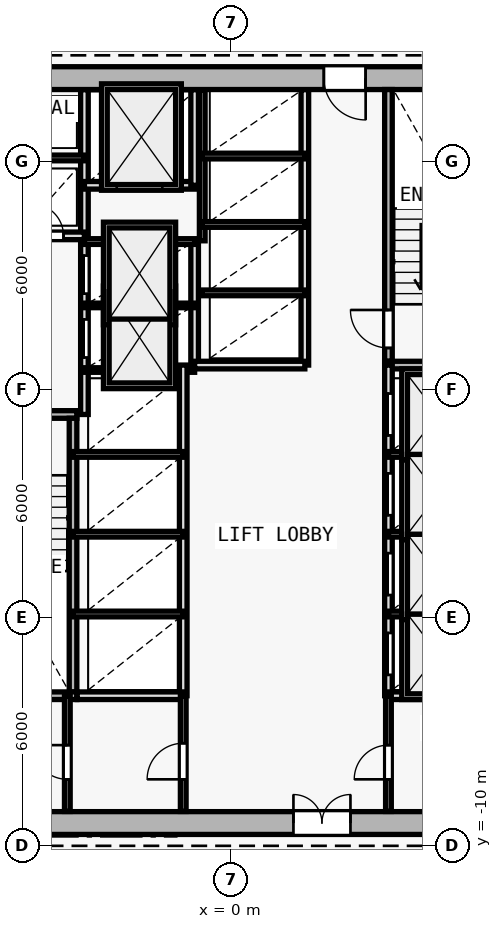
"""IFC4 building model, lengths in metres.
Left out: names, types, materials, properties, quantities, classifications, styles, units other than length and angle.
Written with IfcOpenShell. Run it as: python <this file> out.ifc"""

import sys

from ifc_helpers import new_model, si_unit, direction, frame, frame_2d, origin, origin_2d, place, context, subcontext, project, spatial, rectangle, i_section, extrude, element, fill, save


model = new_model("IFC4")
c1 = context("Model", 3, precision=1e-05, world=origin(), true_north=direction((0.0, 1.0)))
c2 = subcontext(c1, "Body", "Model", "MODEL_VIEW")
j1 = project(units=[si_unit("LENGTHUNIT", "METRE"), si_unit("PLANEANGLEUNIT", "RADIAN")], contexts=[c1])
p1 = place(None, origin())
s1 = spatial("IfcSite", under=j1, at=p1, CompositionType="ELEMENT")
p2 = place(p1, origin())
s2 = spatial("IfcBuilding", under=s1, at=p2, CompositionType="ELEMENT")
p3 = place(p2, frame((0.0, 0.0, 33.6)))
s3 = spatial("IfcBuildingStorey", under=s2, at=p3, CompositionType="ELEMENT", Elevation=33.6)
p4 = place(p3, frame((0.0, -9.4, 0.0), z_axis=(0.0, 0.0, 1.0), x_axis=(1.0, 0.0, 0.0)))
e1 = element("IfcColumn", 1, at=p4, inside=s3, PredefinedType="COLUMN", context=c2, shape_type="SweptSolid", body=[
    extrude(i_section(OverallWidth=0.416, OverallDepth=0.446, WebThickness=0.025, FlangeThickness=0.04, FilletRadius=0.015, at=origin_2d()), origin(), (0.0, 0.0, 1.0), 3.6),
])
p5 = place(p3, frame((-8.0, -9.4, 0.0), z_axis=(0.0, 0.0, 1.0), x_axis=(1.0, 0.0, 0.0)))
e2 = element("IfcWall", 2, at=p5, inside=s3, PredefinedType="SHEAR", context=c2, shape_type="SweptSolid", body=[
    extrude(rectangle(XDim=16.0, YDim=0.6, at=frame_2d((8.0, 0.0))), origin(), (0.0, 0.0, 1.0), 3.35),
])
p6 = place(p5, frame((9.65, 0.0, 0.0)))
e3 = element("IfcOpeningElement", 3, at=p6, cuts=e2, PredefinedType="OPENING", context=c2, shape_type="SweptSolid", body=[
    extrude(rectangle(XDim=1.5, YDim=2.2, at=frame_2d((0.75, 1.1))), frame((0.0, 0.31, 0.0), z_axis=(0.0, -1.0, 0.0), x_axis=(1.0, 0.0, 0.0)), (0.0, 0.0, 1.0), 0.62),
])
p7 = place(p3, frame((8.0, 10.2, 0.0), z_axis=(0.0, 0.0, 1.0), x_axis=(-1.0, 0.0, 0.0)))
e4 = element("IfcWall", 4, at=p7, inside=s3, PredefinedType="SHEAR", context=c2, shape_type="SweptSolid", body=[
    extrude(rectangle(XDim=16.0, YDim=0.6, at=frame_2d((8.0, 0.0))), origin(), (0.0, 0.0, 1.0), 3.35),
])
p8 = place(p7, frame((4.45, 0.0, 0.0)))
e5 = element("IfcOpeningElement", 5, at=p8, cuts=e4, PredefinedType="OPENING", context=c2, shape_type="SweptSolid", body=[
    extrude(rectangle(XDim=1.1, YDim=2.15, at=frame_2d((0.55, 1.075))), frame((0.0, 0.31, 0.0), z_axis=(0.0, -1.0, 0.0), x_axis=(1.0, 0.0, 0.0)), (0.0, 0.0, 1.0), 0.62),
])
p9 = place(p3, frame((-7.4, 1.35, 0.0), z_axis=(0.0, 0.0, 1.0), x_axis=(1.0, 0.0, 0.0)))
e6 = element("IfcWall", 6, at=p9, inside=s3, PredefinedType="SOLIDWALL", context=c2, shape_type="SweptSolid", body=[
    extrude(rectangle(XDim=3.35, YDim=0.2, at=frame_2d((1.675, 0.0))), origin(), (0.0, 0.0, 1.0), 3.35),
])
p10 = place(p9, frame((0.65, 0.0, 0.0)))
e7 = element("IfcOpeningElement", 7, at=p10, cuts=e6, PredefinedType="OPENING", context=c2, shape_type="SweptSolid", body=[
    extrude(rectangle(XDim=1.0, YDim=2.15, at=frame_2d((0.5, 1.075))), frame((0.0, 0.11, 0.0), z_axis=(0.0, -1.0, 0.0), x_axis=(1.0, 0.0, 0.0)), (0.0, 0.0, 1.0), 0.22),
])
p11 = place(p3, frame((-4.15, -5.95, 0.0), z_axis=(0.0, 0.0, 1.0), x_axis=(0.0, 1.0, 0.0)))
e8 = element("IfcWall", 8, at=p11, inside=s3, PredefinedType="SOLIDWALL", context=c2, shape_type="SweptSolid", body=[
    extrude(rectangle(XDim=7.2, YDim=0.2, at=frame_2d((3.6, 0.0))), origin(), (0.0, 0.0, 1.0), 3.35),
])
p12 = place(p3, frame((-3.85, 1.35, 0.0), z_axis=(0.0, 0.0, 1.0), x_axis=(0.0, 1.0, 0.0)))
e9 = element("IfcWall", 9, at=p12, inside=s3, PredefinedType="SOLIDWALL", context=c2, shape_type="SweptSolid", body=[
    extrude(rectangle(XDim=8.545, YDim=0.2, at=frame_2d((4.272, 0.0))), origin(), (0.0, 0.0, 1.0), 3.35),
])
p13 = place(p12, frame((1.5, 0.0, 0.0)))
e10 = element("IfcOpeningElement", 10, at=p13, cuts=e9, PredefinedType="OPENING", context=c2, shape_type="SweptSolid", body=[
    extrude(rectangle(XDim=1.0, YDim=2.15, at=frame_2d((0.5, 1.075))), frame((0.0, 0.11, 0.0), z_axis=(0.0, -1.0, 0.0), x_axis=(1.0, 0.0, 0.0)), (0.0, 0.0, 1.0), 0.22),
])
p14 = place(p12, frame((3.18, 0.0, 0.0)))
e11 = element("IfcOpeningElement", 11, at=p14, cuts=e9, PredefinedType="OPENING", context=c2, shape_type="SweptSolid", body=[
    extrude(rectangle(XDim=1.0, YDim=2.15, at=frame_2d((0.5, 1.075))), frame((0.0, 0.11, 0.0), z_axis=(0.0, -1.0, 0.0), x_axis=(1.0, 0.0, 0.0)), (0.0, 0.0, 1.0), 0.22),
])
p15 = place(p3, frame((-7.395, 6.05, 0.0), z_axis=(0.0, 0.0, 1.0), x_axis=(1.0, 0.0, 0.0)))
e12 = element("IfcWall", 12, at=p15, inside=s3, PredefinedType="SOLIDWALL", context=c2, shape_type="SweptSolid", body=[
    extrude(rectangle(XDim=3.545, YDim=0.2, at=frame_2d((1.772, 0.0))), origin(), (0.0, 0.0, 1.0), 3.35),
])
p16 = place(p15, frame((0.345, 0.0, 0.0)))
e13 = element("IfcOpeningElement", 13, at=p16, cuts=e12, PredefinedType="OPENING", context=c2, shape_type="SweptSolid", body=[
    extrude(rectangle(XDim=0.85, YDim=2.1, at=frame_2d((0.425, 1.05))), frame((0.0, 0.11, 0.0), z_axis=(0.0, -1.0, 0.0), x_axis=(1.0, 0.0, 0.0)), (0.0, 0.0, 1.0), 0.22),
])
p17 = place(p15, frame((2.145, 0.0, 0.0)))
e14 = element("IfcOpeningElement", 14, at=p17, cuts=e12, PredefinedType="OPENING", context=c2, shape_type="SweptSolid", body=[
    extrude(rectangle(XDim=0.85, YDim=2.1, at=frame_2d((0.425, 1.05))), frame((0.0, 0.11, 0.0), z_axis=(0.0, -1.0, 0.0), x_axis=(1.0, 0.0, 0.0)), (0.0, 0.0, 1.0), 0.22),
])
p18 = place(p3, frame((-7.395, 8.1, 0.0), z_axis=(0.0, 0.0, 1.0), x_axis=(1.0, 0.0, 0.0)))
e15 = element("IfcWall", 15, at=p18, inside=s3, PredefinedType="PARTITIONING", context=c2, shape_type="SweptSolid", body=[
    extrude(rectangle(XDim=3.545, YDim=0.15, at=frame_2d((1.772, 0.0))), origin(), (0.0, 0.0, 1.0), 3.35),
])
p19 = place(p3, frame((4.15, 2.75, 0.0), z_axis=(0.0, 0.0, 1.0), x_axis=(0.0, 1.0, 0.0)))
e16 = element("IfcWall", 16, at=p19, inside=s3, PredefinedType="SOLIDWALL", context=c2, shape_type="SweptSolid", body=[
    extrude(rectangle(XDim=7.15, YDim=0.2, at=frame_2d((3.575, 0.0))), origin(), (0.0, 0.0, 1.0), 3.35),
])
p20 = place(p19, frame((0.35, 0.0, 0.0)))
e17 = element("IfcOpeningElement", 17, at=p20, cuts=e16, PredefinedType="OPENING", context=c2, shape_type="SweptSolid", body=[
    extrude(rectangle(XDim=1.0, YDim=2.15, at=frame_2d((0.5, 1.075))), frame((0.0, 0.11, 0.0), z_axis=(0.0, -1.0, 0.0), x_axis=(1.0, 0.0, 0.0)), (0.0, 0.0, 1.0), 0.22),
])
p21 = place(p3, frame((4.05, 2.65, 0.0), z_axis=(0.0, 0.0, 1.0), x_axis=(1.0, 0.0, 0.0)))
e18 = element("IfcWall", 18, at=p21, inside=s3, PredefinedType="SOLIDWALL", context=c2, shape_type="SweptSolid", body=[
    extrude(rectangle(XDim=3.35, YDim=0.2, at=frame_2d((1.675, 0.0))), origin(), (0.0, 0.0, 1.0), 3.35),
])
p22 = place(p3, frame((-0.95, 2.65, 0.0), z_axis=(0.0, 0.0, 1.0), x_axis=(0.0, 1.0, 0.0)))
e19 = element("IfcWall", 19, at=p22, inside=s3, PredefinedType="SOLIDWALL", context=c2, shape_type="SweptSolid", body=[
    extrude(rectangle(XDim=3.27, YDim=0.2, at=frame_2d((1.635, 0.0))), origin(), (0.0, 0.0, 1.0), 3.35),
])
for number, where, z_axis, x_axis in (
    (20, (-3.85, 2.52, 0.0), (0.0, 0.0, 1.0), (1.0, 0.0, 0.0)),
    (21, (-3.85, 4.22, 0.0), (0.0, 0.0, 1.0), (1.0, 0.0, 0.0)),
):
    element("IfcWall", number, at=place(p3, frame(where, z_axis=z_axis, x_axis=x_axis)), inside=s3, PredefinedType="PARTITIONING", context=c2, shape_type="SweptSolid", body=[
        extrude(rectangle(XDim=2.9, YDim=0.12, at=frame_2d((1.45, 0.0))), origin(), (0.0, 0.0, 1.0), 3.35),
    ])
p23 = place(p3, frame((-3.85, 5.9, 0.0), z_axis=(0.0, 0.0, 1.0), x_axis=(1.0, 0.0, 0.0)))
e22 = element("IfcWall", 22, at=p23, inside=s3, PredefinedType="PARTITIONING", context=c2, shape_type="SweptSolid", body=[
    extrude(rectangle(XDim=2.9, YDim=0.15, at=frame_2d((1.45, 0.0))), origin(), (0.0, 0.0, 1.0), 3.35),
])
p24 = place(p3, frame((-3.85, 7.38, 0.0), z_axis=(0.0, 0.0, 1.0), x_axis=(1.0, 0.0, 0.0)))
e23 = element("IfcWall", 23, at=p24, inside=s3, PredefinedType="SOLIDWALL", context=c2, shape_type="SweptSolid", body=[
    extrude(rectangle(XDim=2.9, YDim=0.2, at=frame_2d((1.45, 0.0))), origin(), (0.0, 0.0, 1.0), 3.35),
])
p25 = place(p24, frame((0.85, 0.0, 0.0)))
e24 = element("IfcOpeningElement", 24, at=p25, cuts=e23, PredefinedType="OPENING", context=c2, shape_type="SweptSolid", body=[
    extrude(rectangle(XDim=1.2, YDim=2.2, at=frame_2d((0.6, 1.1))), frame((0.0, 0.11, 0.0), z_axis=(0.0, -1.0, 0.0), x_axis=(1.0, 0.0, 0.0)), (0.0, 0.0, 1.0), 0.22),
])
p26 = place(p3, frame((-0.95, 7.38, 0.0), z_axis=(0.0, 0.0, 1.0), x_axis=(0.0, 1.0, 0.0)))
e25 = element("IfcWall", 25, at=p26, inside=s3, PredefinedType="SOLIDWALL", context=c2, shape_type="SweptSolid", body=[
    extrude(rectangle(XDim=2.515, YDim=0.2, at=frame_2d((1.258, 0.0))), origin(), (0.0, 0.0, 1.0), 3.35),
])
p27 = place(p3, frame((4.15, -6.05, 0.0), z_axis=(0.0, 0.0, 1.0), x_axis=(0.0, 1.0, 0.0)))
e26 = element("IfcWall", 26, at=p27, inside=s3, PredefinedType="SOLIDWALL", context=c2, shape_type="SweptSolid", body=[
    extrude(rectangle(XDim=8.7, YDim=0.2, at=frame_2d((4.35, 0.0))), origin(), (0.0, 0.0, 1.0), 3.35),
])
p28 = place(p27, frame((0.55, 0.0, 0.0)))
e27 = element("IfcOpeningElement", 27, at=p28, cuts=e26, PredefinedType="OPENING", context=c2, shape_type="SweptSolid", body=[
    extrude(rectangle(XDim=1.1, YDim=2.15, at=frame_2d((0.55, 1.075))), frame((0.0, 0.11, 0.0), z_axis=(0.0, -1.0, 0.0), x_axis=(1.0, 0.0, 0.0)), (0.0, 0.0, 1.0), 0.22),
])
p29 = place(p27, frame((2.65, 0.0, 0.0)))
e28 = element("IfcOpeningElement", 28, at=p29, cuts=e26, PredefinedType="OPENING", context=c2, shape_type="SweptSolid", body=[
    extrude(rectangle(XDim=1.1, YDim=2.15, at=frame_2d((0.55, 1.075))), frame((0.0, 0.11, 0.0), z_axis=(0.0, -1.0, 0.0), x_axis=(1.0, 0.0, 0.0)), (0.0, 0.0, 1.0), 0.22),
])
p30 = place(p27, frame((4.75, 0.0, 0.0)))
e29 = element("IfcOpeningElement", 29, at=p30, cuts=e26, PredefinedType="OPENING", context=c2, shape_type="SweptSolid", body=[
    extrude(rectangle(XDim=1.1, YDim=2.15, at=frame_2d((0.55, 1.075))), frame((0.0, 0.11, 0.0), z_axis=(0.0, -1.0, 0.0), x_axis=(1.0, 0.0, 0.0)), (0.0, 0.0, 1.0), 0.22),
])
p31 = place(p27, frame((6.85, 0.0, 0.0)))
e30 = element("IfcOpeningElement", 30, at=p31, cuts=e26, PredefinedType="OPENING", context=c2, shape_type="SweptSolid", body=[
    extrude(rectangle(XDim=1.1, YDim=2.15, at=frame_2d((0.55, 1.075))), frame((0.0, 0.11, 0.0), z_axis=(0.0, -1.0, 0.0), x_axis=(1.0, 0.0, 0.0)), (0.0, 0.0, 1.0), 0.22),
])
for number, where, z_axis, x_axis in (
    (31, (4.15, -3.9, 0.0), (0.0, 0.0, 1.0), (1.0, 0.0, 0.0)),
    (32, (4.15, -1.8, 0.0), (0.0, 0.0, 1.0), (1.0, 0.0, 0.0)),
    (33, (4.15, 0.3, 0.0), (0.0, 0.0, 1.0), (1.0, 0.0, 0.0)),
):
    element("IfcWall", number, at=place(p3, frame(where, z_axis=z_axis, x_axis=x_axis)), inside=s3, PredefinedType="PARTITIONING", context=c2, shape_type="SweptSolid", body=[
        extrude(rectangle(XDim=2.6, YDim=0.15, at=frame_2d((1.3, 0.0))), origin(), (0.0, 0.0, 1.0), 3.35),
    ])
p32 = place(p3, frame((-1.25, -6.05, 0.0), z_axis=(0.0, 0.0, 1.0), x_axis=(0.0, 1.0, 0.0)))
e34 = element("IfcWall", 34, at=p32, inside=s3, PredefinedType="SOLIDWALL", context=c2, shape_type="SweptSolid", body=[
    extrude(rectangle(XDim=8.7, YDim=0.2, at=frame_2d((4.35, 0.0))), origin(), (0.0, 0.0, 1.0), 3.35),
])
for number, where, z_axis, x_axis in (
    (35, (-4.15, -3.9, 0.0), (0.0, 0.0, 1.0), (1.0, 0.0, 0.0)),
    (36, (-4.15, -1.8, 0.0), (0.0, 0.0, 1.0), (1.0, 0.0, 0.0)),
    (37, (-4.15, 0.3, 0.0), (0.0, 0.0, 1.0), (1.0, 0.0, 0.0)),
):
    element("IfcWall", number, at=place(p3, frame(where, z_axis=z_axis, x_axis=x_axis)), inside=s3, PredefinedType="PARTITIONING", context=c2, shape_type="SweptSolid", body=[
        extrude(rectangle(XDim=2.9, YDim=0.15, at=frame_2d((1.45, 0.0))), origin(), (0.0, 0.0, 1.0), 3.35),
    ])
p33 = place(p3, frame((1.95, 2.65, 0.0), z_axis=(0.0, 0.0, 1.0), x_axis=(0.0, 1.0, 0.0)))
e38 = element("IfcWall", 38, at=p33, inside=s3, PredefinedType="SOLIDWALL", context=c2, shape_type="SweptSolid", body=[
    extrude(rectangle(XDim=7.245, YDim=0.2, at=frame_2d((3.623, 0.0))), origin(), (0.0, 0.0, 1.0), 3.35),
])
p34 = place(p3, frame((-0.95, 2.65, 0.0), z_axis=(0.0, 0.0, 1.0), x_axis=(1.0, 0.0, 0.0)))
e39 = element("IfcWall", 39, at=p34, inside=s3, PredefinedType="SOLIDWALL", context=c2, shape_type="SweptSolid", body=[
    extrude(rectangle(XDim=2.9, YDim=0.2, at=frame_2d((1.45, 0.0))), origin(), (0.0, 0.0, 1.0), 3.35),
])
p35 = place(p3, frame((-0.75, 5.92, 0.0), z_axis=(0.0, 0.0, 1.0), x_axis=(0.0, 1.0, 0.0)))
e40 = element("IfcWall", 40, at=p35, inside=s3, PredefinedType="PARTITIONING", context=c2, shape_type="SweptSolid", body=[
    extrude(rectangle(XDim=3.975, YDim=0.15, at=frame_2d((1.988, 0.0))), origin(), (0.0, 0.0, 1.0), 3.35),
])
for number, where, z_axis, x_axis in (
    (41, (-0.75, 4.55, 0.0), (0.0, 0.0, 1.0), (1.0, 0.0, 0.0)),
    (42, (-0.75, 6.35, 0.0), (0.0, 0.0, 1.0), (1.0, 0.0, 0.0)),
    (43, (-0.75, 8.15, 0.0), (0.0, 0.0, 1.0), (1.0, 0.0, 0.0)),
):
    element("IfcWall", number, at=place(p3, frame(where, z_axis=z_axis, x_axis=x_axis)), inside=s3, PredefinedType="PARTITIONING", context=c2, shape_type="SweptSolid", body=[
        extrude(rectangle(XDim=2.7, YDim=0.15, at=frame_2d((1.35, 0.0))), origin(), (0.0, 0.0, 1.0), 3.35),
    ])
p36 = place(p3, frame((-7.4, -6.05, 0.0), z_axis=(0.0, 0.0, 1.0), x_axis=(1.0, 0.0, 0.0)))
e44 = element("IfcWall", 44, at=p36, inside=s3, PredefinedType="SOLIDWALL", context=c2, shape_type="SweptSolid", body=[
    extrude(rectangle(XDim=3.35, YDim=0.2, at=frame_2d((1.675, 0.0))), origin(), (0.0, 0.0, 1.0), 3.35),
])
p37 = place(p3, frame((-4.04, -6.05, 0.0), z_axis=(0.0, 0.0, 1.0), x_axis=(1.0, 0.0, 0.0)))
e45 = element("IfcWall", 45, at=p37, inside=s3, PredefinedType="SOLIDWALL", context=c2, shape_type="SweptSolid", body=[
    extrude(rectangle(XDim=2.79, YDim=0.2, at=frame_2d((1.395, 0.0))), origin(), (0.0, 0.0, 1.0), 3.35),
])
p38 = place(p3, frame((4.15, -6.05, 0.0), z_axis=(0.0, 0.0, 1.0), x_axis=(1.0, 0.0, 0.0)))
e46 = element("IfcWall", 46, at=p38, inside=s3, PredefinedType="SOLIDWALL", context=c2, shape_type="SweptSolid", body=[
    extrude(rectangle(XDim=3.245, YDim=0.2, at=frame_2d((1.623, 0.0))), origin(), (0.0, 0.0, 1.0), 3.35),
])
p39 = place(p3, frame((-1.25, -9.095, 0.0), z_axis=(0.0, 0.0, 1.0), x_axis=(0.0, 1.0, 0.0)))
e47 = element("IfcWall", 47, at=p39, inside=s3, PredefinedType="PARTITIONING", context=c2, shape_type="SweptSolid", body=[
    extrude(rectangle(XDim=3.045, YDim=0.15, at=frame_2d((1.522, 0.0))), origin(), (0.0, 0.0, 1.0), 3.35),
])
p40 = place(p39, frame((0.845, 0.0, 0.0)))
e48 = element("IfcOpeningElement", 48, at=p40, cuts=e47, PredefinedType="OPENING", context=c2, shape_type="SweptSolid", body=[
    extrude(rectangle(XDim=0.95, YDim=2.1, at=frame_2d((0.475, 1.05))), frame((0.0, 0.085, 0.0), z_axis=(0.0, -1.0, 0.0), x_axis=(1.0, 0.0, 0.0)), (0.0, 0.0, 1.0), 0.17),
])
p41 = place(p3, frame((4.15, -9.095, 0.0), z_axis=(0.0, 0.0, 1.0), x_axis=(0.0, 1.0, 0.0)))
e49 = element("IfcWall", 49, at=p41, inside=s3, PredefinedType="PARTITIONING", context=c2, shape_type="SweptSolid", body=[
    extrude(rectangle(XDim=3.045, YDim=0.15, at=frame_2d((1.522, 0.0))), origin(), (0.0, 0.0, 1.0), 3.35),
])
p42 = place(p41, frame((0.845, 0.0, 0.0)))
e50 = element("IfcOpeningElement", 50, at=p42, cuts=e49, PredefinedType="OPENING", context=c2, shape_type="SweptSolid", body=[
    extrude(rectangle(XDim=0.9, YDim=2.1, at=frame_2d((0.45, 1.05))), frame((0.0, 0.085, 0.0), z_axis=(0.0, -1.0, 0.0), x_axis=(1.0, 0.0, 0.0)), (0.0, 0.0, 1.0), 0.17),
])
p43 = place(p3, frame((-4.3, -9.095, 0.0), z_axis=(0.0, 0.0, 1.0), x_axis=(0.0, 1.0, 0.0)))
e51 = element("IfcWall", 51, at=p43, inside=s3, PredefinedType="PARTITIONING", context=c2, shape_type="SweptSolid", body=[
    extrude(rectangle(XDim=3.045, YDim=0.15, at=frame_2d((1.522, 0.0))), origin(), (0.0, 0.0, 1.0), 3.35),
])
p44 = place(p43, frame((0.845, 0.0, 0.0)))
e52 = element("IfcOpeningElement", 52, at=p44, cuts=e51, PredefinedType="OPENING", context=c2, shape_type="SweptSolid", body=[
    extrude(rectangle(XDim=0.9, YDim=2.1, at=frame_2d((0.45, 1.05))), frame((0.0, 0.085, 0.0), z_axis=(0.0, -1.0, 0.0), x_axis=(1.0, 0.0, 0.0)), (0.0, 0.0, 1.0), 0.17),
])
p45 = place(p6, origin())
e53 = element("IfcDoor", 53, at=p45, inside=s3, OperationType="DOUBLE_DOOR_SINGLE_SWING", PredefinedType="DOOR", context=c2, shape_type="SweptSolid", body=[
    extrude(rectangle(XDim=1.5, YDim=2.2, at=frame_2d((0.75, 1.1))), frame((0.0, 0.025, 0.0), z_axis=(0.0, -1.0, 0.0), x_axis=(1.0, 0.0, 0.0)), (0.0, 0.0, 1.0), 0.05),
])
fill(e3, e53)
p46 = place(p8, origin())
e54 = element("IfcDoor", 54, at=p46, inside=s3, OperationType="SINGLE_SWING_LEFT", PredefinedType="DOOR", context=c2, shape_type="SweptSolid", body=[
    extrude(rectangle(XDim=1.1, YDim=2.15, at=frame_2d((0.55, 1.075))), frame((0.0, 0.025, 0.0), z_axis=(0.0, -1.0, 0.0), x_axis=(1.0, 0.0, 0.0)), (0.0, 0.0, 1.0), 0.05),
])
fill(e5, e54)
p47 = place(p17, origin())
e55 = element("IfcDoor", 55, at=p47, inside=s3, OperationType="SINGLE_SWING_LEFT", PredefinedType="DOOR", context=c2, shape_type="SweptSolid", body=[
    extrude(rectangle(XDim=0.85, YDim=2.1, at=frame_2d((0.425, 1.05))), frame((0.0, 0.025, 0.0), z_axis=(0.0, -1.0, 0.0), x_axis=(1.0, 0.0, 0.0)), (0.0, 0.0, 1.0), 0.05),
])
fill(e14, e55)
p48 = place(p20, origin())
e56 = element("IfcDoor", 56, at=p48, inside=s3, OperationType="SINGLE_SWING_RIGHT", PredefinedType="DOOR", context=c2, shape_type="SweptSolid", body=[
    extrude(rectangle(XDim=1.0, YDim=2.15, at=frame_2d((0.5, 1.075))), frame((0.0, 0.025, 0.0), z_axis=(0.0, -1.0, 0.0), x_axis=(1.0, 0.0, 0.0)), (0.0, 0.0, 1.0), 0.05),
])
fill(e17, e56)
p49 = place(p25, origin())
e57 = element("IfcDoor", 57, at=p49, inside=s3, OperationType="DOUBLE_DOOR_SLIDING", PredefinedType="DOOR", context=c2, shape_type="SweptSolid", body=[
    extrude(rectangle(XDim=1.2, YDim=2.2, at=frame_2d((0.6, 1.1))), frame((0.0, 0.025, 0.0), z_axis=(0.0, -1.0, 0.0), x_axis=(1.0, 0.0, 0.0)), (0.0, 0.0, 1.0), 0.05),
])
fill(e24, e57)
p50 = place(p28, origin())
e58 = element("IfcDoor", 58, at=p50, inside=s3, OperationType="DOUBLE_DOOR_SLIDING", PredefinedType="DOOR", context=c2, shape_type="SweptSolid", body=[
    extrude(rectangle(XDim=1.1, YDim=2.15, at=frame_2d((0.55, 1.075))), frame((0.0, 0.025, 0.0), z_axis=(0.0, -1.0, 0.0), x_axis=(1.0, 0.0, 0.0)), (0.0, 0.0, 1.0), 0.05),
])
fill(e27, e58)
p51 = place(p29, origin())
e59 = element("IfcDoor", 59, at=p51, inside=s3, OperationType="DOUBLE_DOOR_SLIDING", PredefinedType="DOOR", context=c2, shape_type="SweptSolid", body=[
    extrude(rectangle(XDim=1.1, YDim=2.15, at=frame_2d((0.55, 1.075))), frame((0.0, 0.025, 0.0), z_axis=(0.0, -1.0, 0.0), x_axis=(1.0, 0.0, 0.0)), (0.0, 0.0, 1.0), 0.05),
])
fill(e28, e59)
p52 = place(p30, origin())
e60 = element("IfcDoor", 60, at=p52, inside=s3, OperationType="DOUBLE_DOOR_SLIDING", PredefinedType="DOOR", context=c2, shape_type="SweptSolid", body=[
    extrude(rectangle(XDim=1.1, YDim=2.15, at=frame_2d((0.55, 1.075))), frame((0.0, 0.025, 0.0), z_axis=(0.0, -1.0, 0.0), x_axis=(1.0, 0.0, 0.0)), (0.0, 0.0, 1.0), 0.05),
])
fill(e29, e60)
p53 = place(p31, origin())
e61 = element("IfcDoor", 61, at=p53, inside=s3, OperationType="DOUBLE_DOOR_SLIDING", PredefinedType="DOOR", context=c2, shape_type="SweptSolid", body=[
    extrude(rectangle(XDim=1.1, YDim=2.15, at=frame_2d((0.55, 1.075))), frame((0.0, 0.025, 0.0), z_axis=(0.0, -1.0, 0.0), x_axis=(1.0, 0.0, 0.0)), (0.0, 0.0, 1.0), 0.05),
])
fill(e30, e61)
p54 = place(p13, origin())
e62 = element("IfcDoor", 62, at=p54, inside=s3, OperationType="DOUBLE_DOOR_SLIDING", PredefinedType="DOOR", context=c2, shape_type="SweptSolid", body=[
    extrude(rectangle(XDim=1.0, YDim=2.15, at=frame_2d((0.5, 1.075))), frame((0.0, 0.025, 0.0), z_axis=(0.0, -1.0, 0.0), x_axis=(1.0, 0.0, 0.0)), (0.0, 0.0, 1.0), 0.05),
])
fill(e10, e62)
p55 = place(p14, origin())
e63 = element("IfcDoor", 63, at=p55, inside=s3, OperationType="DOUBLE_DOOR_SLIDING", PredefinedType="DOOR", context=c2, shape_type="SweptSolid", body=[
    extrude(rectangle(XDim=1.0, YDim=2.15, at=frame_2d((0.5, 1.075))), frame((0.0, 0.025, 0.0), z_axis=(0.0, -1.0, 0.0), x_axis=(1.0, 0.0, 0.0)), (0.0, 0.0, 1.0), 0.05),
])
fill(e11, e63)
p56 = place(p40, origin())
e64 = element("IfcDoor", 64, at=p56, inside=s3, OperationType="SINGLE_SWING_LEFT", PredefinedType="DOOR", context=c2, shape_type="SweptSolid", body=[
    extrude(rectangle(XDim=0.95, YDim=2.1, at=frame_2d((0.475, 1.05))), frame((0.0, 0.025, 0.0), z_axis=(0.0, -1.0, 0.0), x_axis=(1.0, 0.0, 0.0)), (0.0, 0.0, 1.0), 0.05),
])
fill(e48, e64)
p57 = place(p44, origin())
e65 = element("IfcDoor", 65, at=p57, inside=s3, OperationType="SINGLE_SWING_RIGHT", PredefinedType="DOOR", context=c2, shape_type="SweptSolid", body=[
    extrude(rectangle(XDim=0.9, YDim=2.1, at=frame_2d((0.45, 1.05))), frame((0.0, 0.025, 0.0), z_axis=(0.0, -1.0, 0.0), x_axis=(1.0, 0.0, 0.0)), (0.0, 0.0, 1.0), 0.05),
])
fill(e52, e65)
p58 = place(p42, origin())
e66 = element("IfcDoor", 66, at=p58, inside=s3, OperationType="SINGLE_SWING_LEFT", PredefinedType="DOOR", context=c2, shape_type="SweptSolid", body=[
    extrude(rectangle(XDim=0.9, YDim=2.1, at=frame_2d((0.45, 1.05))), frame((0.0, 0.025, 0.0), z_axis=(0.0, -1.0, 0.0), x_axis=(1.0, 0.0, 0.0)), (0.0, 0.0, 1.0), 0.05),
])
fill(e50, e66)
save(model, sys.argv[1])
